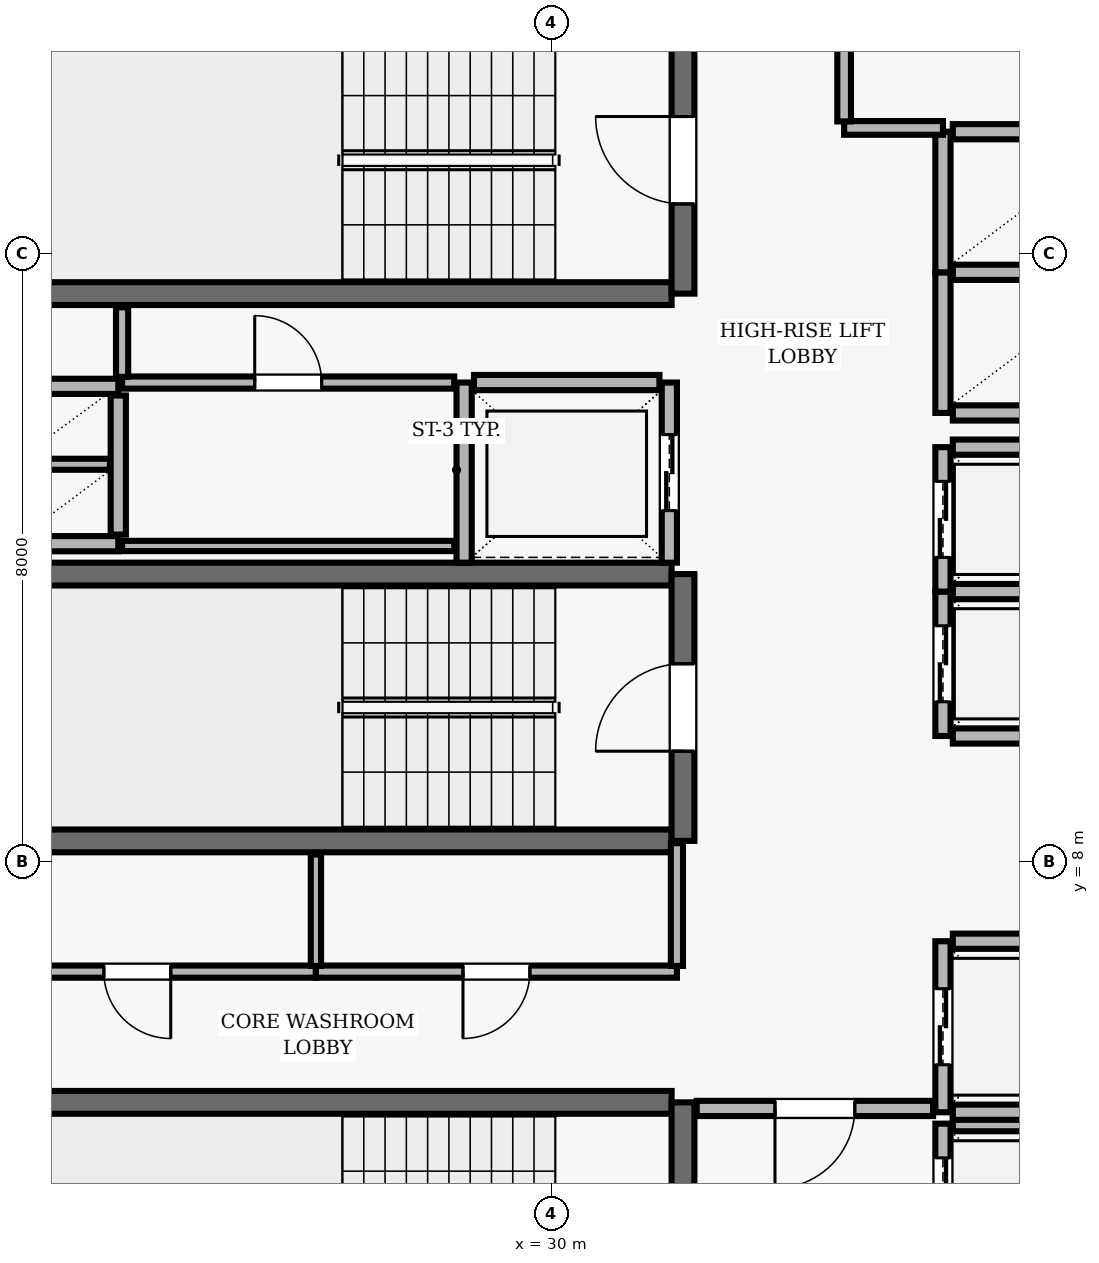
"""IFC4 building model, lengths in metres.
Left out: names, types, materials, properties, quantities, classifications, styles, units other than length and angle.
Written with IfcOpenShell. Run it as: python <this file> out.ifc"""

import sys

from ifc_helpers import new_model, si_unit, direction, frame, frame_2d, origin, place, context, subcontext, project, spatial, rectangle, extrude, element, fill, save


model = new_model("IFC4")
c1 = context("Model", 3, precision=1e-05, world=origin(), true_north=direction((0.0, 1.0)))
c2 = subcontext(c1, "Body", "Model", "MODEL_VIEW")
j1 = project(units=[si_unit("LENGTHUNIT", "METRE"), si_unit("PLANEANGLEUNIT", "RADIAN")], contexts=[c1])
p1 = place(None, origin())
s1 = spatial("IfcSite", under=j1, at=p1, CompositionType="ELEMENT")
p2 = place(p1, origin())
s2 = spatial("IfcBuilding", under=s1, at=p2, CompositionType="ELEMENT")
p3 = place(p2, frame((0.0, 0.0, 199.2)))
s3 = spatial("IfcBuildingStorey", under=s2, at=p3, CompositionType="ELEMENT", Elevation=199.2)
p4 = place(p3, frame((31.58, 4.83, 0.0), z_axis=(0.0, 0.0, 1.0), x_axis=(-1.0, 0.0, 0.0)))
e1 = element("IfcWall", 1, at=p4, inside=s3, PredefinedType="SHEAR", context=c2, shape_type="SweptSolid", body=[
    extrude(rectangle(XDim=8.36, YDim=0.3, at=frame_2d((4.18, 0.0))), origin(), (0.0, 0.0, 1.0), 3.69),
])
p5 = place(p3, frame((31.73, 0.96, 0.0), z_axis=(0.0, 0.0, 1.0), x_axis=(0.0, 1.0, 0.0)))
e2 = element("IfcWall", 2, at=p5, inside=s3, PredefinedType="SHEAR", context=c2, shape_type="SweptSolid", body=[
    extrude(rectangle(XDim=3.87, YDim=0.3, at=frame_2d((1.935, 0.0))), origin(), (0.0, 0.0, 1.0), 3.69),
])
p6 = place(p5, frame((1.54, 0.0, 0.0)))
e3 = element("IfcOpeningElement", 3, at=p6, cuts=e2, PredefinedType="OPENING", context=c2, shape_type="SweptSolid", body=[
    extrude(rectangle(XDim=1.15, YDim=2.15, at=frame_2d((0.575, 1.075))), frame((0.0, 0.16, 0.0), z_axis=(0.0, -1.0, 0.0), x_axis=(1.0, 0.0, 0.0)), (0.0, 0.0, 1.0), 0.32),
])
p7 = place(p3, frame((23.22, 15.47, 0.0), z_axis=(0.0, 0.0, 1.0), x_axis=(1.0, 0.0, 0.0)))
e4 = element("IfcWall", 4, at=p7, inside=s3, PredefinedType="SHEAR", context=c2, shape_type="SweptSolid", body=[
    extrude(rectangle(XDim=8.36, YDim=0.3, at=frame_2d((4.18, 0.0))), origin(), (0.0, 0.0, 1.0), 3.69),
])
p8 = place(p3, frame((31.73, 15.47, 0.0), z_axis=(0.0, 0.0, 1.0), x_axis=(0.0, 1.0, 0.0)))
e5 = element("IfcWall", 5, at=p8, inside=s3, PredefinedType="SHEAR", context=c2, shape_type="SweptSolid", body=[
    extrude(rectangle(XDim=3.51, YDim=0.3, at=frame_2d((1.755, 0.0))), origin(), (0.0, 0.0, 1.0), 3.69),
])
p9 = place(p8, frame((1.18, 0.0, 0.0)))
e6 = element("IfcOpeningElement", 6, at=p9, cuts=e5, PredefinedType="OPENING", context=c2, shape_type="SweptSolid", body=[
    extrude(rectangle(XDim=1.15, YDim=2.15, at=frame_2d((0.575, 1.075))), frame((0.0, 0.16, 0.0), z_axis=(0.0, -1.0, 0.0), x_axis=(1.0, 0.0, 0.0)), (0.0, 0.0, 1.0), 0.32),
])
for number, where, z_axis, x_axis in (
    (7, (31.58, 11.78, 0.0), (0.0, 0.0, 1.0), (-1.0, 0.0, 0.0)),
    (8, (23.22, 8.27, 0.0), (0.0, 0.0, 1.0), (1.0, 0.0, 0.0)),
):
    element("IfcWall", number, at=place(p3, frame(where, z_axis=z_axis, x_axis=x_axis)), inside=s3, PredefinedType="SHEAR", context=c2, shape_type="SweptSolid", body=[
        extrude(rectangle(XDim=8.36, YDim=0.3, at=frame_2d((4.18, 0.0))), origin(), (0.0, 0.0, 1.0), 3.69),
    ])
p10 = place(p3, frame((31.73, 8.27, 0.0), z_axis=(0.0, 0.0, 1.0), x_axis=(0.0, 1.0, 0.0)))
e9 = element("IfcWall", 9, at=p10, inside=s3, PredefinedType="SHEAR", context=c2, shape_type="SweptSolid", body=[
    extrude(rectangle(XDim=3.51, YDim=0.3, at=frame_2d((1.755, 0.0))), origin(), (0.0, 0.0, 1.0), 3.69),
])
p11 = place(p10, frame((1.18, 0.0, 0.0)))
e10 = element("IfcOpeningElement", 10, at=p11, cuts=e9, PredefinedType="OPENING", context=c2, shape_type="SweptSolid", body=[
    extrude(rectangle(XDim=1.15, YDim=2.15, at=frame_2d((0.575, 1.075))), frame((0.0, 0.16, 0.0), z_axis=(0.0, -1.0, 0.0), x_axis=(1.0, 0.0, 0.0)), (0.0, 0.0, 1.0), 0.32),
])
p12 = place(p3, frame((35.15, 4.55, 0.0), z_axis=(0.0, 0.0, 1.0), x_axis=(0.0, -1.0, 0.0)))
e11 = element("IfcWall", 11, at=p12, inside=s3, PredefinedType="SOLIDWALL", context=c2, shape_type="SweptSolid", body=[
    extrude(rectangle(XDim=2.1, YDim=0.2, at=frame_2d((1.05, 0.0))), origin(), (0.0, 0.0, 1.0), 3.69),
])
p13 = place(p12, frame((0.45, 0.0, 0.0)))
e12 = element("IfcOpeningElement", 12, at=p13, cuts=e11, PredefinedType="OPENING", context=c2, shape_type="SweptSolid", body=[
    extrude(rectangle(XDim=1.2, YDim=2.15, at=frame_2d((0.6, 1.075))), frame((0.0, 0.11, 0.0), z_axis=(0.0, -1.0, 0.0), x_axis=(1.0, 0.0, 0.0)), (0.0, 0.0, 1.0), 0.22),
])
p14 = place(p3, frame((37.42, 4.55, 0.0), z_axis=(0.0, 0.0, 1.0), x_axis=(-1.0, 0.0, 0.0)))
e13 = element("IfcWall", 13, at=p14, inside=s3, PredefinedType="SOLIDWALL", context=c2, shape_type="SweptSolid", body=[
    extrude(rectangle(XDim=2.14, YDim=0.2, at=frame_2d((1.07, 0.0))), origin(), (0.0, 0.0, 1.0), 3.69),
])
p15 = place(p3, frame((35.15, 6.95, 0.0), z_axis=(0.0, 0.0, 1.0), x_axis=(0.0, -1.0, 0.0)))
e14 = element("IfcWall", 14, at=p15, inside=s3, PredefinedType="SOLIDWALL", context=c2, shape_type="SweptSolid", body=[
    extrude(rectangle(XDim=2.25, YDim=0.2, at=frame_2d((1.125, 0.0))), origin(), (0.0, 0.0, 1.0), 3.69),
])
p16 = place(p15, frame((0.625, 0.0, 0.0)))
e15 = element("IfcOpeningElement", 15, at=p16, cuts=e14, PredefinedType="OPENING", context=c2, shape_type="SweptSolid", body=[
    extrude(rectangle(XDim=1.0, YDim=2.1, at=frame_2d((0.5, 1.05))), frame((0.0, 0.11, 0.0), z_axis=(0.0, -1.0, 0.0), x_axis=(1.0, 0.0, 0.0)), (0.0, 0.0, 1.0), 0.22),
])
for number, where, z_axis, x_axis in (
    (16, (35.28, 4.7, 0.0), (0.0, 0.0, 1.0), (1.0, 0.0, 0.0)),
    (17, (37.42, 6.95, 0.0), (0.0, 0.0, 1.0), (-1.0, 0.0, 0.0)),
):
    element("IfcWall", number, at=place(p3, frame(where, z_axis=z_axis, x_axis=x_axis)), inside=s3, PredefinedType="SOLIDWALL", context=c2, shape_type="SweptSolid", body=[
        extrude(rectangle(XDim=2.14, YDim=0.2, at=frame_2d((1.07, 0.0))), origin(), (0.0, 0.0, 1.0), 3.69),
    ])
p17 = place(p3, frame((35.15, 11.55, 0.0), z_axis=(0.0, 0.0, 1.0), x_axis=(0.0, -1.0, 0.0)))
e18 = element("IfcWall", 18, at=p17, inside=s3, PredefinedType="SOLIDWALL", context=c2, shape_type="SweptSolid", body=[
    extrude(rectangle(XDim=1.9, YDim=0.2, at=frame_2d((0.95, 0.0))), origin(), (0.0, 0.0, 1.0), 3.69),
])
p18 = place(p17, frame((0.45, 0.0, 0.0)))
e19 = element("IfcOpeningElement", 19, at=p18, cuts=e18, PredefinedType="OPENING", context=c2, shape_type="SweptSolid", body=[
    extrude(rectangle(XDim=1.0, YDim=2.1, at=frame_2d((0.5, 1.05))), frame((0.0, 0.11, 0.0), z_axis=(0.0, -1.0, 0.0), x_axis=(1.0, 0.0, 0.0)), (0.0, 0.0, 1.0), 0.22),
])
for number, where, z_axis, x_axis in (
    (20, (35.28, 9.65, 0.0), (0.0, 0.0, 1.0), (1.0, 0.0, 0.0)),
    (21, (37.42, 11.55, 0.0), (0.0, 0.0, 1.0), (-1.0, 0.0, 0.0)),
):
    element("IfcWall", number, at=place(p3, frame(where, z_axis=z_axis, x_axis=x_axis)), inside=s3, PredefinedType="SOLIDWALL", context=c2, shape_type="SweptSolid", body=[
        extrude(rectangle(XDim=2.14, YDim=0.2, at=frame_2d((1.07, 0.0))), origin(), (0.0, 0.0, 1.0), 3.69),
    ])
p19 = place(p3, frame((35.15, 13.45, 0.0), z_axis=(0.0, 0.0, 1.0), x_axis=(0.0, -1.0, 0.0)))
e22 = element("IfcWall", 22, at=p19, inside=s3, PredefinedType="SOLIDWALL", context=c2, shape_type="SweptSolid", body=[
    extrude(rectangle(XDim=1.9, YDim=0.2, at=frame_2d((0.95, 0.0))), origin(), (0.0, 0.0, 1.0), 3.69),
])
p20 = place(p19, frame((0.45, 0.0, 0.0)))
e23 = element("IfcOpeningElement", 23, at=p20, cuts=e22, PredefinedType="OPENING", context=c2, shape_type="SweptSolid", body=[
    extrude(rectangle(XDim=1.0, YDim=2.1, at=frame_2d((0.5, 1.05))), frame((0.0, 0.11, 0.0), z_axis=(0.0, -1.0, 0.0), x_axis=(1.0, 0.0, 0.0)), (0.0, 0.0, 1.0), 0.22),
])
p21 = place(p3, frame((37.42, 13.45, 0.0), z_axis=(0.0, 0.0, 1.0), x_axis=(-1.0, 0.0, 0.0)))
e24 = element("IfcWall", 24, at=p21, inside=s3, PredefinedType="SOLIDWALL", context=c2, shape_type="SweptSolid", body=[
    extrude(rectangle(XDim=2.14, YDim=0.2, at=frame_2d((1.07, 0.0))), origin(), (0.0, 0.0, 1.0), 3.69),
])
p22 = place(p3, frame((28.85, 14.3, 0.0), z_axis=(0.0, 0.0, 1.0), x_axis=(0.0, -1.0, 0.0)))
e25 = element("IfcWall", 25, at=p22, inside=s3, PredefinedType="SOLIDWALL", context=c2, shape_type="SweptSolid", body=[
    extrude(rectangle(XDim=2.37, YDim=0.2, at=frame_2d((1.185, 0.0))), origin(), (0.0, 0.0, 1.0), 3.69),
])
p23 = place(p3, frame((31.55, 11.93, 0.0), z_axis=(0.0, 0.0, 1.0), x_axis=(0.0, 1.0, 0.0)))
e26 = element("IfcWall", 26, at=p23, inside=s3, PredefinedType="SOLIDWALL", context=c2, shape_type="SweptSolid", body=[
    extrude(rectangle(XDim=2.37, YDim=0.2, at=frame_2d((1.185, 0.0))), origin(), (0.0, 0.0, 1.0), 3.69),
])
p24 = place(p23, frame((0.685, 0.0, 0.0)))
e27 = element("IfcOpeningElement", 27, at=p24, cuts=e26, PredefinedType="OPENING", context=c2, shape_type="SweptSolid", body=[
    extrude(rectangle(XDim=1.0, YDim=2.1, at=frame_2d((0.5, 1.05))), frame((0.0, 0.11, 0.0), z_axis=(0.0, -1.0, 0.0), x_axis=(1.0, 0.0, 0.0)), (0.0, 0.0, 1.0), 0.22),
])
p25 = place(p3, frame((31.42, 14.3, 0.0), z_axis=(0.0, 0.0, 1.0), x_axis=(-1.0, 0.0, 0.0)))
e28 = element("IfcWall", 28, at=p25, inside=s3, PredefinedType="SOLIDWALL", context=c2, shape_type="SweptSolid", body=[
    extrude(rectangle(XDim=2.44, YDim=0.2, at=frame_2d((1.22, 0.0))), origin(), (0.0, 0.0, 1.0), 3.69),
])
p26 = place(p3, frame((35.15, 15.75, 0.0), z_axis=(0.0, 0.0, 1.0), x_axis=(0.0, -1.0, 0.0)))
e29 = element("IfcWall", 29, at=p26, inside=s3, PredefinedType="SOLIDWALL", context=c2, shape_type="SweptSolid", body=[
    extrude(rectangle(XDim=1.85, YDim=0.2, at=frame_2d((0.925, 0.0))), origin(), (0.0, 0.0, 1.0), 3.69),
])
for number, where, z_axis, x_axis in (
    (30, (35.28, 13.9, 0.0), (0.0, 0.0, 1.0), (1.0, 0.0, 0.0)),
    (31, (37.42, 15.75, 0.0), (0.0, 0.0, 1.0), (-1.0, 0.0, 0.0)),
):
    element("IfcWall", number, at=place(p3, frame(where, z_axis=z_axis, x_axis=x_axis)), inside=s3, PredefinedType="SOLIDWALL", context=c2, shape_type="SweptSolid", body=[
        extrude(rectangle(XDim=2.14, YDim=0.2, at=frame_2d((1.07, 0.0))), origin(), (0.0, 0.0, 1.0), 3.69),
    ])
p27 = place(p3, frame((35.15, 17.6, 0.0), z_axis=(0.0, 0.0, 1.0), x_axis=(0.0, -1.0, 0.0)))
e32 = element("IfcWall", 32, at=p27, inside=s3, PredefinedType="SOLIDWALL", context=c2, shape_type="SweptSolid", body=[
    extrude(rectangle(XDim=1.85, YDim=0.2, at=frame_2d((0.925, 0.0))), origin(), (0.0, 0.0, 1.0), 3.69),
])
p28 = place(p3, frame((37.42, 17.6, 0.0), z_axis=(0.0, 0.0, 1.0), x_axis=(-1.0, 0.0, 0.0)))
e33 = element("IfcWall", 33, at=p28, inside=s3, PredefinedType="SOLIDWALL", context=c2, shape_type="SweptSolid", body=[
    extrude(rectangle(XDim=2.14, YDim=0.2, at=frame_2d((1.07, 0.0))), origin(), (0.0, 0.0, 1.0), 3.69),
])
for number, where, z_axis, x_axis in (
    (34, (22.9, 14.25, 0.0), (0.0, 0.0, 1.0), (1.0, 0.0, 0.0)),
    (35, (22.9, 12.18, 0.0), (0.0, 0.0, 1.0), (1.0, 0.0, 0.0)),
):
    element("IfcWall", number, at=place(p3, frame(where, z_axis=z_axis, x_axis=x_axis)), inside=s3, PredefinedType="SOLIDWALL", context=c2, shape_type="SweptSolid", body=[
        extrude(rectangle(XDim=1.4, YDim=0.2, at=frame_2d((0.7, 0.0))), origin(), (0.0, 0.0, 1.0), 3.69),
    ])
p29 = place(p3, frame((24.3, 12.3, 0.0), z_axis=(0.0, 0.0, 1.0), x_axis=(0.0, 1.0, 0.0)))
e36 = element("IfcWall", 36, at=p29, inside=s3, PredefinedType="SOLIDWALL", context=c2, shape_type="SweptSolid", body=[
    extrude(rectangle(XDim=1.83, YDim=0.2, at=frame_2d((0.915, 0.0))), origin(), (0.0, 0.0, 1.0), 3.69),
])
p30 = place(p3, frame((23.01, 13.225, 0.0), z_axis=(0.0, 0.0, 1.0), x_axis=(1.0, 0.0, 0.0)))
e37 = element("IfcWall", 37, at=p30, inside=s3, PredefinedType="PARTITIONING", context=c2, shape_type="SweptSolid", body=[
    extrude(rectangle(XDim=1.18, YDim=0.145, at=frame_2d((0.59, 0.0))), origin(), (0.0, 0.0, 1.0), 3.69),
])
p31 = place(p3, frame((24.35, 12.15, 0.0), z_axis=(0.0, 0.0, 1.0), x_axis=(1.0, 0.0, 0.0)))
e38 = element("IfcWall", 38, at=p31, inside=s3, PredefinedType="PARTITIONING", context=c2, shape_type="SweptSolid", body=[
    extrude(rectangle(XDim=4.37, YDim=0.135, at=frame_2d((2.185, 0.0))), origin(), (0.0, 0.0, 1.0), 3.69),
])
p32 = place(p3, frame((24.35, 14.3, 0.0), z_axis=(0.0, 0.0, 1.0), x_axis=(1.0, 0.0, 0.0)))
e39 = element("IfcWall", 39, at=p32, inside=s3, PredefinedType="PARTITIONING", context=c2, shape_type="SweptSolid", body=[
    extrude(rectangle(XDim=4.37, YDim=0.16, at=frame_2d((2.185, 0.0))), origin(), (0.0, 0.0, 1.0), 3.69),
])
p33 = place(p32, frame((1.745, 0.0, 0.0)))
e40 = element("IfcOpeningElement", 40, at=p33, cuts=e39, PredefinedType="OPENING", context=c2, shape_type="SweptSolid", body=[
    extrude(rectangle(XDim=0.88, YDim=2.1, at=frame_2d((0.44, 1.05))), frame((0.0, 0.09, 0.0), z_axis=(0.0, -1.0, 0.0), x_axis=(1.0, 0.0, 0.0)), (0.0, 0.0, 1.0), 0.18),
])
p34 = place(p3, frame((26.9, 6.55, 0.0), z_axis=(0.0, 0.0, 1.0), x_axis=(-1.0, 0.0, 0.0)))
e41 = element("IfcWall", 41, at=p34, inside=s3, PredefinedType="PARTITIONING", context=c2, shape_type="SweptSolid", body=[
    extrude(rectangle(XDim=4.7, YDim=0.16, at=frame_2d((2.35, 0.0))), origin(), (0.0, 0.0, 1.0), 3.69),
])
p35 = place(p34, frame((1.91, 0.0, 0.0)))
e42 = element("IfcOpeningElement", 42, at=p35, cuts=e41, PredefinedType="OPENING", context=c2, shape_type="SweptSolid", body=[
    extrude(rectangle(XDim=0.88, YDim=2.1, at=frame_2d((0.44, 1.05))), frame((0.0, 0.09, 0.0), z_axis=(0.0, -1.0, 0.0), x_axis=(1.0, 0.0, 0.0)), (0.0, 0.0, 1.0), 0.18),
])
p36 = place(p3, frame((31.65, 6.55, 0.0), z_axis=(0.0, 0.0, 1.0), x_axis=(-1.0, 0.0, 0.0)))
e43 = element("IfcWall", 43, at=p36, inside=s3, PredefinedType="PARTITIONING", context=c2, shape_type="SweptSolid", body=[
    extrude(rectangle(XDim=4.75, YDim=0.16, at=frame_2d((2.375, 0.0))), origin(), (0.0, 0.0, 1.0), 3.69),
])
p37 = place(p36, frame((1.935, 0.0, 0.0)))
e44 = element("IfcOpeningElement", 44, at=p37, cuts=e43, PredefinedType="OPENING", context=c2, shape_type="SweptSolid", body=[
    extrude(rectangle(XDim=0.88, YDim=2.1, at=frame_2d((0.44, 1.05))), frame((0.0, 0.09, 0.0), z_axis=(0.0, -1.0, 0.0), x_axis=(1.0, 0.0, 0.0)), (0.0, 0.0, 1.0), 0.18),
])
p38 = place(p3, frame((33.85, 17.65, 0.0), z_axis=(0.0, 0.0, 1.0), x_axis=(1.0, 0.0, 0.0)))
e45 = element("IfcWall", 45, at=p38, inside=s3, PredefinedType="PARTITIONING", context=c2, shape_type="SweptSolid", body=[
    extrude(rectangle(XDim=1.3, YDim=0.18, at=frame_2d((0.65, 0.0))), origin(), (0.0, 0.0, 1.0), 3.69),
])
p39 = place(p3, frame((35.02, 4.75, 0.0), z_axis=(0.0, 0.0, 1.0), x_axis=(-1.0, 0.0, 0.0)))
e46 = element("IfcWall", 46, at=p39, inside=s3, PredefinedType="SOLIDWALL", context=c2, shape_type="SweptSolid", body=[
    extrude(rectangle(XDim=3.11, YDim=0.2, at=frame_2d((1.555, 0.0))), origin(), (0.0, 0.0, 1.0), 3.69),
])
p40 = place(p39, frame((1.03, 0.0, 0.0)))
e47 = element("IfcOpeningElement", 47, at=p40, cuts=e46, PredefinedType="OPENING", context=c2, shape_type="SweptSolid", body=[
    extrude(rectangle(XDim=1.05, YDim=2.15, at=frame_2d((0.525, 1.075))), frame((0.0, 0.11, 0.0), z_axis=(0.0, -1.0, 0.0), x_axis=(1.0, 0.0, 0.0)), (0.0, 0.0, 1.0), 0.22),
])
p41 = place(p3, frame((24.35, 15.29, 0.0), z_axis=(0.0, 0.0, 1.0), x_axis=(0.0, -1.0, 0.0)))
e48 = element("IfcWall", 48, at=p41, inside=s3, PredefinedType="PARTITIONING", context=c2, shape_type="SweptSolid", body=[
    extrude(rectangle(XDim=0.915, YDim=0.16, at=frame_2d((0.458, 0.0))), origin(), (0.0, 0.0, 1.0), 3.69),
])
p42 = place(p3, frame((26.9, 6.625, 0.0), z_axis=(0.0, 0.0, 1.0), x_axis=(0.0, 1.0, 0.0)))
e49 = element("IfcWall", 49, at=p42, inside=s3, PredefinedType="PARTITIONING", context=c2, shape_type="SweptSolid", body=[
    extrude(rectangle(XDim=1.465, YDim=0.135, at=frame_2d((0.732, 0.0))), origin(), (0.0, 0.0, 1.0), 3.69),
])
p43 = place(p3, frame((31.65, 8.24, 0.0), z_axis=(0.0, 0.0, 1.0), x_axis=(0.0, -1.0, 0.0)))
e50 = element("IfcWall", 50, at=p43, inside=s3, PredefinedType="PARTITIONING", context=c2, shape_type="SweptSolid", body=[
    extrude(rectangle(XDim=1.615, YDim=0.16, at=frame_2d((0.808, 0.0))), origin(), (0.0, 0.0, 1.0), 3.69),
])
p44 = place(p3, frame((33.85, 17.735, 0.0), z_axis=(0.0, 0.0, 1.0), x_axis=(0.0, 1.0, 0.0)))
e51 = element("IfcWall", 51, at=p44, inside=s3, PredefinedType="PARTITIONING", context=c2, shape_type="SweptSolid", body=[
    extrude(rectangle(XDim=2.93, YDim=0.18, at=frame_2d((1.465, 0.0))), origin(), (0.0, 0.0, 1.0), 3.69),
])
p45 = place(p44, frame((0.99, 0.0, 0.0)))
e52 = element("IfcOpeningElement", 52, at=p45, cuts=e51, PredefinedType="OPENING", context=c2, shape_type="SweptSolid", body=[
    extrude(rectangle(XDim=0.95, YDim=2.1, at=frame_2d((0.475, 1.05))), frame((0.0, 0.1, 0.0), z_axis=(0.0, -1.0, 0.0), x_axis=(1.0, 0.0, 0.0)), (0.0, 0.0, 1.0), 0.2),
])
p46 = place(p9, origin())
e53 = element("IfcDoor", 53, at=p46, inside=s3, OperationType="SINGLE_SWING_RIGHT", PredefinedType="DOOR", context=c2, shape_type="SweptSolid", body=[
    extrude(rectangle(XDim=1.15, YDim=2.15, at=frame_2d((0.575, 1.075))), frame((0.0, 0.025, 0.0), z_axis=(0.0, -1.0, 0.0), x_axis=(1.0, 0.0, 0.0)), (0.0, 0.0, 1.0), 0.05),
])
fill(e6, e53)
p47 = place(p11, origin())
e54 = element("IfcDoor", 54, at=p47, inside=s3, OperationType="SINGLE_SWING_LEFT", PredefinedType="DOOR", context=c2, shape_type="SweptSolid", body=[
    extrude(rectangle(XDim=1.15, YDim=2.15, at=frame_2d((0.575, 1.075))), frame((0.0, 0.025, 0.0), z_axis=(0.0, -1.0, 0.0), x_axis=(1.0, 0.0, 0.0)), (0.0, 0.0, 1.0), 0.05),
])
fill(e10, e54)
p48 = place(p13, origin())
e55 = element("IfcDoor", 55, at=p48, inside=s3, OperationType="DOUBLE_DOOR_SLIDING", PredefinedType="DOOR", context=c2, shape_type="SweptSolid", body=[
    extrude(rectangle(XDim=1.2, YDim=2.15, at=frame_2d((0.6, 1.075))), frame((0.0, 0.025, 0.0), z_axis=(0.0, -1.0, 0.0), x_axis=(1.0, 0.0, 0.0)), (0.0, 0.0, 1.0), 0.05),
])
fill(e12, e55)
p49 = place(p16, origin())
e56 = element("IfcDoor", 56, at=p49, inside=s3, OperationType="DOUBLE_DOOR_SLIDING", PredefinedType="DOOR", context=c2, shape_type="SweptSolid", body=[
    extrude(rectangle(XDim=1.0, YDim=2.1, at=frame_2d((0.5, 1.05))), frame((0.0, 0.025, 0.0), z_axis=(0.0, -1.0, 0.0), x_axis=(1.0, 0.0, 0.0)), (0.0, 0.0, 1.0), 0.05),
])
fill(e15, e56)
p50 = place(p18, origin())
e57 = element("IfcDoor", 57, at=p50, inside=s3, OperationType="DOUBLE_DOOR_SLIDING", PredefinedType="DOOR", context=c2, shape_type="SweptSolid", body=[
    extrude(rectangle(XDim=1.0, YDim=2.1, at=frame_2d((0.5, 1.05))), frame((0.0, 0.025, 0.0), z_axis=(0.0, -1.0, 0.0), x_axis=(1.0, 0.0, 0.0)), (0.0, 0.0, 1.0), 0.05),
])
fill(e19, e57)
p51 = place(p20, origin())
e58 = element("IfcDoor", 58, at=p51, inside=s3, OperationType="DOUBLE_DOOR_SLIDING", PredefinedType="DOOR", context=c2, shape_type="SweptSolid", body=[
    extrude(rectangle(XDim=1.0, YDim=2.1, at=frame_2d((0.5, 1.05))), frame((0.0, 0.025, 0.0), z_axis=(0.0, -1.0, 0.0), x_axis=(1.0, 0.0, 0.0)), (0.0, 0.0, 1.0), 0.05),
])
fill(e23, e58)
p52 = place(p24, origin())
e59 = element("IfcDoor", 59, at=p52, inside=s3, OperationType="DOUBLE_DOOR_SLIDING", PredefinedType="DOOR", context=c2, shape_type="SweptSolid", body=[
    extrude(rectangle(XDim=1.0, YDim=2.1, at=frame_2d((0.5, 1.05))), frame((0.0, 0.025, 0.0), z_axis=(0.0, -1.0, 0.0), x_axis=(1.0, 0.0, 0.0)), (0.0, 0.0, 1.0), 0.05),
])
fill(e27, e59)
p53 = place(p40, origin())
e60 = element("IfcDoor", 60, at=p53, inside=s3, OperationType="SINGLE_SWING_RIGHT", PredefinedType="DOOR", context=c2, shape_type="SweptSolid", body=[
    extrude(rectangle(XDim=1.05, YDim=2.15, at=frame_2d((0.525, 1.075))), frame((0.0, 0.025, 0.0), z_axis=(0.0, -1.0, 0.0), x_axis=(1.0, 0.0, 0.0)), (0.0, 0.0, 1.0), 0.05),
])
fill(e47, e60)
p54 = place(p35, origin())
e61 = element("IfcDoor", 61, at=p54, inside=s3, OperationType="SINGLE_SWING_LEFT", PredefinedType="DOOR", context=c2, shape_type="SweptSolid", body=[
    extrude(rectangle(XDim=0.88, YDim=2.1, at=frame_2d((0.44, 1.05))), frame((0.0, 0.025, 0.0), z_axis=(0.0, -1.0, 0.0), x_axis=(1.0, 0.0, 0.0)), (0.0, 0.0, 1.0), 0.05),
])
fill(e42, e61)
p55 = place(p37, origin())
e62 = element("IfcDoor", 62, at=p55, inside=s3, OperationType="SINGLE_SWING_RIGHT", PredefinedType="DOOR", context=c2, shape_type="SweptSolid", body=[
    extrude(rectangle(XDim=0.88, YDim=2.1, at=frame_2d((0.44, 1.05))), frame((0.0, 0.025, 0.0), z_axis=(0.0, -1.0, 0.0), x_axis=(1.0, 0.0, 0.0)), (0.0, 0.0, 1.0), 0.05),
])
fill(e44, e62)
p56 = place(p33, origin())
e63 = element("IfcDoor", 63, at=p56, inside=s3, OperationType="SINGLE_SWING_LEFT", PredefinedType="DOOR", context=c2, shape_type="SweptSolid", body=[
    extrude(rectangle(XDim=0.88, YDim=2.1, at=frame_2d((0.44, 1.05))), frame((0.0, 0.025, 0.0), z_axis=(0.0, -1.0, 0.0), x_axis=(1.0, 0.0, 0.0)), (0.0, 0.0, 1.0), 0.05),
])
fill(e40, e63)
save(model, sys.argv[1])
